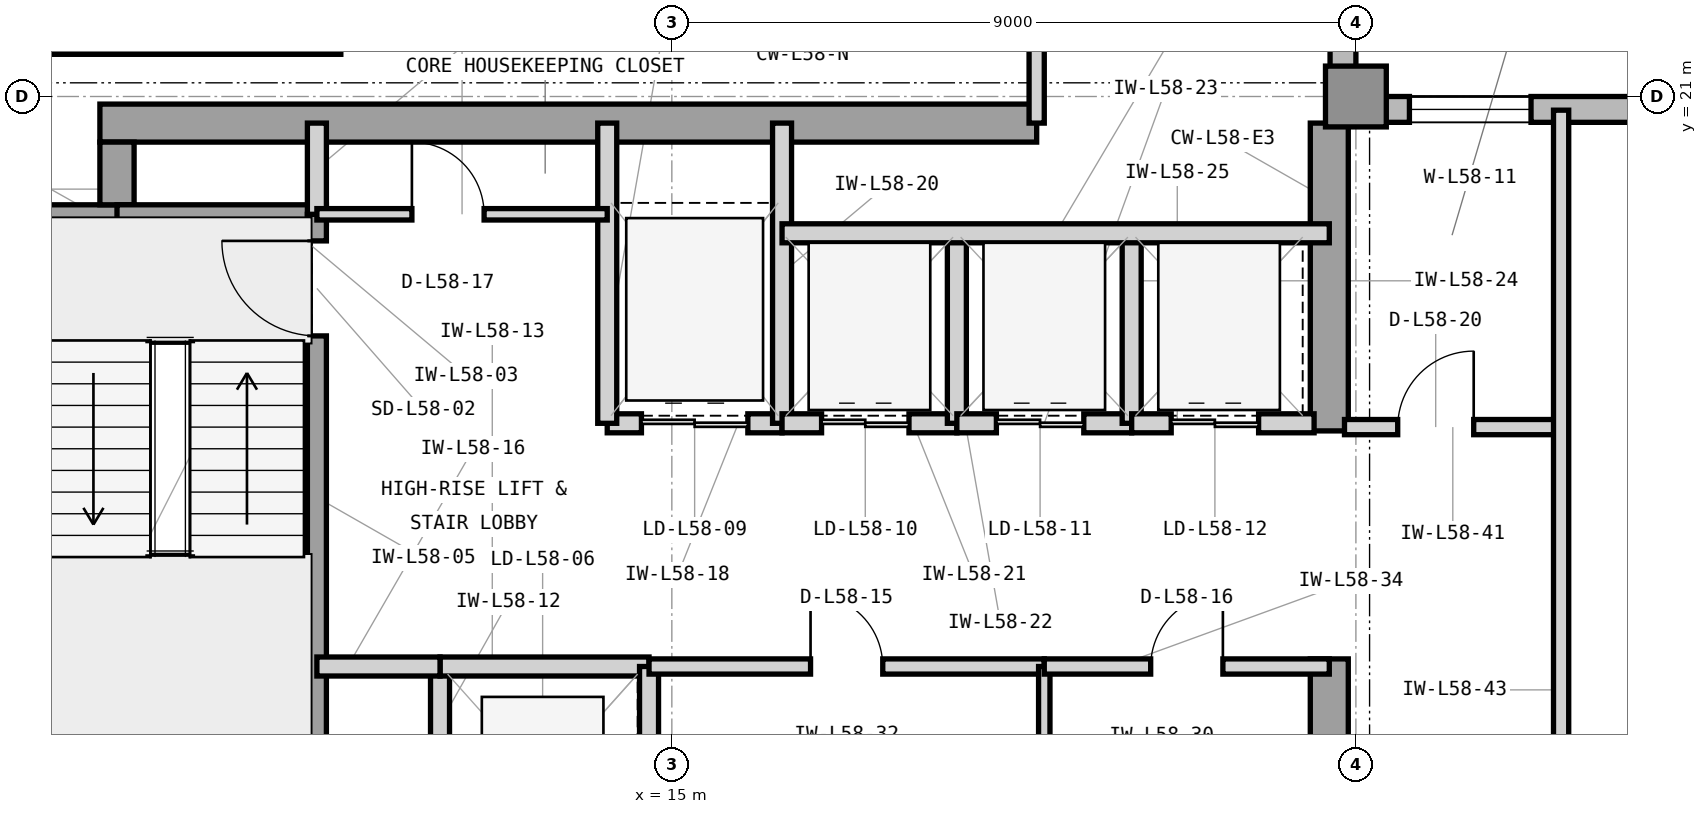
"""IFC4 building model, lengths in metres.
Left out: names, types, materials, properties, quantities, classifications, styles, units other than length and angle.
Written with IfcOpenShell. Run it as: python <this file> out.ifc"""

import sys

from ifc_helpers import new_model, si_unit, direction, frame, frame_2d, origin, origin_2d, place, context, subcontext, project, spatial, rectangle, extrude, element, fill, save


model = new_model("IFC4")
c1 = context("Model", 3, precision=1e-05, world=origin(), true_north=direction((0.0, 1.0)))
c2 = subcontext(c1, "Body", "Model", "MODEL_VIEW")
j1 = project(units=[si_unit("LENGTHUNIT", "METRE"), si_unit("PLANEANGLEUNIT", "RADIAN")], contexts=[c1])
p1 = place(None, origin())
s1 = spatial("IfcSite", under=j1, at=p1, CompositionType="ELEMENT")
p2 = place(p1, origin())
s2 = spatial("IfcBuilding", under=s1, at=p2, CompositionType="ELEMENT")
p3 = place(p2, frame((0.0, 0.0, 239.1)))
s3 = spatial("IfcBuildingStorey", under=s2, at=p3, CompositionType="ELEMENT", Elevation=239.1)
p4 = place(p3, frame((7.475, 20.65, 0.0), z_axis=(0.0, 0.0, 1.0), x_axis=(1.0, 0.0, 0.0)))
e1 = element("IfcWall", 1, at=p4, inside=s3, PredefinedType="SHEAR", context=c2, shape_type="SweptSolid", body=[
    extrude(rectangle(XDim=12.325, YDim=0.5, at=frame_2d((6.163, 0.0))), origin(), (0.0, 0.0, 1.0), 3.9),
])
p5 = place(p3, frame((23.65, 10.4, 0.0), z_axis=(0.0, 0.0, 1.0), x_axis=(0.0, 1.0, 0.0)))
e2 = element("IfcWall", 2, at=p5, inside=s3, PredefinedType="SHEAR", context=c2, shape_type="SweptSolid", body=[
    extrude(rectangle(XDim=3.2, YDim=0.5, at=frame_2d((1.6, 0.0))), origin(), (0.0, 0.0, 1.0), 3.9),
])
p6 = place(p3, frame((23.65, 16.6, 0.0), z_axis=(0.0, 0.0, 1.0), x_axis=(0.0, 1.0, 0.0)))
e3 = element("IfcWall", 3, at=p6, inside=s3, PredefinedType="SHEAR", context=c2, shape_type="SweptSolid", body=[
    extrude(rectangle(XDim=4.05, YDim=0.5, at=frame_2d((2.025, 0.0))), origin(), (0.0, 0.0, 1.0), 3.9),
])
p7 = place(p3, frame((6.6, 19.35, 0.0), z_axis=(0.0, 0.0, 1.0), x_axis=(1.0, 0.0, 0.0)))
e4 = element("IfcWall", 4, at=p7, inside=s3, PredefinedType="SHEAR", context=c2, shape_type="SweptSolid", body=[
    extrude(rectangle(XDim=1.325, YDim=0.45, at=frame_2d((0.663, 0.0))), origin(), (0.0, 0.0, 1.0), 3.9),
])
p8 = place(p3, frame((7.7, 19.575, 0.0), z_axis=(0.0, 0.0, 1.0), x_axis=(0.0, 1.0, 0.0)))
e5 = element("IfcWall", 5, at=p8, inside=s3, PredefinedType="SHEAR", context=c2, shape_type="SweptSolid", body=[
    extrude(rectangle(XDim=0.825, YDim=0.45, at=frame_2d((0.413, 0.0))), origin(), (0.0, 0.0, 1.0), 3.9),
])
p9 = place(p3, frame((24.0, 21.0, 0.0), z_axis=(0.0, 0.0, 1.0), x_axis=(1.0, 0.0, 0.0)))
e6 = element("IfcColumn", 6, at=p9, inside=s3, PredefinedType="COLUMN", context=c2, shape_type="SweptSolid", body=[
    extrude(rectangle(XDim=0.8, YDim=0.8, at=origin_2d()), origin(), (0.0, 0.0, 1.0), 3.9),
])
p10 = place(p3, frame((52.4, 20.83, 0.0), z_axis=(0.0, 0.0, 1.0), x_axis=(-1.0, 0.0, 0.0)))
e7 = element("IfcWall", 7, at=p10, inside=s3, PredefinedType="STANDARD", context=c2, shape_type="SweptSolid", body=[
    extrude(rectangle(XDim=28.4, YDim=0.34, at=frame_2d((14.2, 0.0))), origin(), (0.0, 0.0, 1.0), 3.7),
])
p11 = place(p10, frame((5.95, 0.0, 0.9)))
e8 = element("IfcOpeningElement", 8, at=p11, cuts=e7, PredefinedType="OPENING", context=c2, shape_type="SweptSolid", body=[
    extrude(rectangle(XDim=2.3, YDim=2.2, at=frame_2d((1.15, 1.1))), frame((0.0, 0.18, 0.0), z_axis=(0.0, -1.0, 0.0), x_axis=(1.0, 0.0, 0.0)), (0.0, 0.0, 1.0), 0.36),
])
p12 = place(p10, frame((15.417, 0.0, 0.9)))
e9 = element("IfcOpeningElement", 9, at=p12, cuts=e7, PredefinedType="OPENING", context=c2, shape_type="SweptSolid", body=[
    extrude(rectangle(XDim=2.3, YDim=2.2, at=frame_2d((1.15, 1.1))), frame((0.0, 0.18, 0.0), z_axis=(0.0, -1.0, 0.0), x_axis=(1.0, 0.0, 0.0)), (0.0, 0.0, 1.0), 0.36),
])
p13 = place(p10, frame((26.096, 0.0, 0.9)))
e10 = element("IfcOpeningElement", 10, at=p13, cuts=e7, PredefinedType="OPENING", context=c2, shape_type="SweptSolid", body=[
    extrude(rectangle(XDim=1.6, YDim=2.2, at=frame_2d((0.8, 1.1))), frame((0.0, 0.18, 0.0), z_axis=(0.0, -1.0, 0.0), x_axis=(1.0, 0.0, 0.0)), (0.0, 0.0, 1.0), 0.36),
])
p14 = place(p3, frame((23.83, 21.0, 0.0), z_axis=(0.0, 0.0, 1.0), x_axis=(0.0, 1.0, 0.0)))
e11 = element("IfcWall", 11, at=p14, inside=s3, PredefinedType="STANDARD", context=c2, shape_type="SweptSolid", body=[
    extrude(rectangle(XDim=19.4, YDim=0.34, at=frame_2d((9.7, 0.0))), origin(), (0.0, 0.0, 1.0), 3.7),
])
p15 = place(p14, frame((10.975, 0.0, 0.9)))
e12 = element("IfcOpeningElement", 12, at=p15, cuts=e11, PredefinedType="OPENING", context=c2, shape_type="SweptSolid", body=[
    extrude(rectangle(XDim=2.3, YDim=2.2, at=frame_2d((1.15, 1.1))), frame((0.0, 0.18, 0.0), z_axis=(0.0, -1.0, 0.0), x_axis=(1.0, 0.0, 0.0)), (0.0, 0.0, 1.0), 0.36),
])
p16 = place(p3, frame((7.7, 19.45, 0.0), z_axis=(0.0, 0.0, 1.0), x_axis=(1.0, 0.0, 0.0)))
e13 = element("IfcWall", 13, at=p16, inside=s3, PredefinedType="SHEAR", context=c2, shape_type="SweptSolid", body=[
    extrude(rectangle(XDim=2.755, YDim=0.25, at=frame_2d((1.377, 0.0))), origin(), (0.0, 0.0, 1.0), 3.9),
])
p17 = place(p3, frame((10.33, 12.0, 0.0), z_axis=(0.0, 0.0, 1.0), x_axis=(0.0, 1.0, 0.0)))
e14 = element("IfcWall", 14, at=p17, inside=s3, PredefinedType="SHEAR", context=c2, shape_type="SweptSolid", body=[
    extrude(rectangle(XDim=7.45, YDim=0.25, at=frame_2d((3.725, 0.0))), origin(), (0.0, 0.0, 1.0), 3.9),
])
p18 = place(p17, frame((5.85, 0.0, 0.0)))
e15 = element("IfcOpeningElement", 15, at=p18, cuts=e14, PredefinedType="OPENING", context=c2, shape_type="SweptSolid", body=[
    extrude(rectangle(XDim=1.25, YDim=2.2, at=frame_2d((0.625, 1.1))), frame((0.0, 0.135, 0.0), z_axis=(0.0, -1.0, 0.0), x_axis=(1.0, 0.0, 0.0)), (0.0, 0.0, 1.0), 0.27),
])
p19 = place(p3, frame((10.33, 19.45, 0.0), z_axis=(0.0, 0.0, 1.0), x_axis=(0.0, 1.0, 0.0)))
e16 = element("IfcWall", 16, at=p19, inside=s3, PredefinedType="PARTITIONING", context=c2, shape_type="SweptSolid", body=[
    extrude(rectangle(XDim=1.2, YDim=0.25, at=frame_2d((0.6, 0.0))), origin(), (0.0, 0.0, 1.0), 3.69),
])
p20 = place(p3, frame((11.95, 10.5, 0.0), z_axis=(0.0, 0.0, 1.0), x_axis=(0.0, 1.0, 0.0)))
e17 = element("IfcWall", 17, at=p20, inside=s3, PredefinedType="PARTITIONING", context=c2, shape_type="SweptSolid", body=[
    extrude(rectangle(XDim=3.0, YDim=0.25, at=frame_2d((1.5, 0.0))), origin(), (0.0, 0.0, 1.0), 3.69),
])
p21 = place(p3, frame((11.95, 13.5, 0.0), z_axis=(0.0, 0.0, 1.0), x_axis=(1.0, 0.0, 0.0)))
e18 = element("IfcWall", 18, at=p21, inside=s3, PredefinedType="PARTITIONING", context=c2, shape_type="SweptSolid", body=[
    extrude(rectangle(XDim=2.75, YDim=0.25, at=frame_2d((1.375, 0.0))), origin(), (0.0, 0.0, 1.0), 3.073),
])
p22 = place(p3, frame((14.7, 10.5, 0.0), z_axis=(0.0, 0.0, 1.0), x_axis=(0.0, 1.0, 0.0)))
e19 = element("IfcWall", 19, at=p22, inside=s3, PredefinedType="PARTITIONING", context=c2, shape_type="SweptSolid", body=[
    extrude(rectangle(XDim=3.0, YDim=0.25, at=frame_2d((1.5, 0.0))), origin(), (0.0, 0.0, 1.0), 3.69),
])
p23 = place(p3, frame((10.33, 13.5, 0.0), z_axis=(0.0, 0.0, 1.0), x_axis=(1.0, 0.0, 0.0)))
e20 = element("IfcWall", 20, at=p23, inside=s3, PredefinedType="PARTITIONING", context=c2, shape_type="SweptSolid", body=[
    extrude(rectangle(XDim=1.62, YDim=0.25, at=frame_2d((0.81, 0.0))), origin(), (0.0, 0.0, 1.0), 3.073),
])
p24 = place(p3, frame((14.15, 16.7, 0.0), z_axis=(0.0, 0.0, 1.0), x_axis=(1.0, 0.0, 0.0)))
e21 = element("IfcWall", 21, at=p24, inside=s3, PredefinedType="PARTITIONING", context=c2, shape_type="SweptSolid", body=[
    extrude(rectangle(XDim=2.3, YDim=0.25, at=frame_2d((1.15, 0.0))), origin(), (0.0, 0.0, 1.0), 3.073),
])
p25 = place(p24, frame((0.45, 0.0, 0.0)))
e22 = element("IfcOpeningElement", 22, at=p25, cuts=e21, PredefinedType="OPENING", context=c2, shape_type="SweptSolid", body=[
    extrude(rectangle(XDim=1.4, YDim=2.35, at=frame_2d((0.7, 1.175))), frame((0.0, 0.135, 0.0), z_axis=(0.0, -1.0, 0.0), x_axis=(1.0, 0.0, 0.0)), (0.0, 0.0, 1.0), 0.27),
])
for number, where, z_axis, x_axis in (
    (23, (14.15, 16.7, 0.0), (0.0, 0.0, 1.0), (0.0, 1.0, 0.0)),
    (24, (16.45, 16.7, 0.0), (0.0, 0.0, 1.0), (0.0, 1.0, 0.0)),
):
    element("IfcWall", number, at=place(p3, frame(where, z_axis=z_axis, x_axis=x_axis)), inside=s3, PredefinedType="PARTITIONING", context=c2, shape_type="SweptSolid", body=[
        extrude(rectangle(XDim=3.95, YDim=0.25, at=frame_2d((1.975, 0.0))), origin(), (0.0, 0.0, 1.0), 3.69),
    ])
p26 = place(p3, frame((16.45, 16.7, 0.0), z_axis=(0.0, 0.0, 1.0), x_axis=(1.0, 0.0, 0.0)))
e25 = element("IfcWall", 25, at=p26, inside=s3, PredefinedType="PARTITIONING", context=c2, shape_type="SweptSolid", body=[
    extrude(rectangle(XDim=2.3, YDim=0.25, at=frame_2d((1.15, 0.0))), origin(), (0.0, 0.0, 1.0), 3.073),
])
p27 = place(p26, frame((0.52, 0.0, 0.0)))
e26 = element("IfcOpeningElement", 26, at=p27, cuts=e25, PredefinedType="OPENING", context=c2, shape_type="SweptSolid", body=[
    extrude(rectangle(XDim=1.15, YDim=2.25, at=frame_2d((0.575, 1.125))), frame((0.0, 0.135, 0.0), z_axis=(0.0, -1.0, 0.0), x_axis=(1.0, 0.0, 0.0)), (0.0, 0.0, 1.0), 0.27),
])
p28 = place(p3, frame((18.75, 16.7, 0.0), z_axis=(0.0, 0.0, 1.0), x_axis=(0.0, 1.0, 0.0)))
e27 = element("IfcWall", 27, at=p28, inside=s3, PredefinedType="PARTITIONING", context=c2, shape_type="SweptSolid", body=[
    extrude(rectangle(XDim=2.5, YDim=0.25, at=frame_2d((1.25, 0.0))), origin(), (0.0, 0.0, 1.0), 3.69),
])
p29 = place(p3, frame((18.75, 16.7, 0.0), z_axis=(0.0, 0.0, 1.0), x_axis=(1.0, 0.0, 0.0)))
e28 = element("IfcWall", 28, at=p29, inside=s3, PredefinedType="PARTITIONING", context=c2, shape_type="SweptSolid", body=[
    extrude(rectangle(XDim=2.3, YDim=0.25, at=frame_2d((1.15, 0.0))), origin(), (0.0, 0.0, 1.0), 3.073),
])
p30 = place(p29, frame((0.52, 0.0, 0.0)))
e29 = element("IfcOpeningElement", 29, at=p30, cuts=e28, PredefinedType="OPENING", context=c2, shape_type="SweptSolid", body=[
    extrude(rectangle(XDim=1.15, YDim=2.25, at=frame_2d((0.575, 1.125))), frame((0.0, 0.135, 0.0), z_axis=(0.0, -1.0, 0.0), x_axis=(1.0, 0.0, 0.0)), (0.0, 0.0, 1.0), 0.27),
])
p31 = place(p3, frame((21.05, 16.7, 0.0), z_axis=(0.0, 0.0, 1.0), x_axis=(0.0, 1.0, 0.0)))
e30 = element("IfcWall", 30, at=p31, inside=s3, PredefinedType="PARTITIONING", context=c2, shape_type="SweptSolid", body=[
    extrude(rectangle(XDim=2.5, YDim=0.25, at=frame_2d((1.25, 0.0))), origin(), (0.0, 0.0, 1.0), 3.69),
])
p32 = place(p3, frame((21.05, 16.7, 0.0), z_axis=(0.0, 0.0, 1.0), x_axis=(1.0, 0.0, 0.0)))
e31 = element("IfcWall", 31, at=p32, inside=s3, PredefinedType="PARTITIONING", context=c2, shape_type="SweptSolid", body=[
    extrude(rectangle(XDim=2.4, YDim=0.25, at=frame_2d((1.2, 0.0))), origin(), (0.0, 0.0, 1.0), 3.073),
])
p33 = place(p32, frame((0.52, 0.0, 0.0)))
e32 = element("IfcOpeningElement", 32, at=p33, cuts=e31, PredefinedType="OPENING", context=c2, shape_type="SweptSolid", body=[
    extrude(rectangle(XDim=1.15, YDim=2.25, at=frame_2d((0.575, 1.125))), frame((0.0, 0.135, 0.0), z_axis=(0.0, -1.0, 0.0), x_axis=(1.0, 0.0, 0.0)), (0.0, 0.0, 1.0), 0.27),
])
p34 = place(p3, frame((16.45, 19.2, 0.0), z_axis=(0.0, 0.0, 1.0), x_axis=(1.0, 0.0, 0.0)))
e33 = element("IfcWall", 33, at=p34, inside=s3, PredefinedType="PARTITIONING", context=c2, shape_type="SweptSolid", body=[
    extrude(rectangle(XDim=7.2, YDim=0.25, at=frame_2d((3.6, 0.0))), origin(), (0.0, 0.0, 1.0), 3.69),
])
p35 = place(p3, frame((14.7, 13.5, 0.0), z_axis=(0.0, 0.0, 1.0), x_axis=(1.0, 0.0, 0.0)))
e34 = element("IfcWall", 34, at=p35, inside=s3, PredefinedType="PARTITIONING", context=c2, shape_type="SweptSolid", body=[
    extrude(rectangle(XDim=5.2, YDim=0.2, at=frame_2d((2.6, 0.0))), origin(), (0.0, 0.0, 1.0), 3.073),
])
p36 = place(p35, frame((2.125, 0.0, 0.0)))
e35 = element("IfcOpeningElement", 35, at=p36, cuts=e34, PredefinedType="OPENING", context=c2, shape_type="SweptSolid", body=[
    extrude(rectangle(XDim=0.95, YDim=2.1, at=frame_2d((0.475, 1.05))), frame((0.0, 0.11, 0.0), z_axis=(0.0, -1.0, 0.0), x_axis=(1.0, 0.0, 0.0)), (0.0, 0.0, 1.0), 0.22),
])
p37 = place(p3, frame((19.9, 9.88, 0.0), z_axis=(0.0, 0.0, 1.0), x_axis=(0.0, 1.0, 0.0)))
e36 = element("IfcWall", 36, at=p37, inside=s3, PredefinedType="PARTITIONING", context=c2, shape_type="SweptSolid", body=[
    extrude(rectangle(XDim=3.62, YDim=0.15, at=frame_2d((1.81, 0.0))), origin(), (0.0, 0.0, 1.0), 3.69),
])
p38 = place(p3, frame((19.9, 13.5, 0.0), z_axis=(0.0, 0.0, 1.0), x_axis=(1.0, 0.0, 0.0)))
e37 = element("IfcWall", 37, at=p38, inside=s3, PredefinedType="PARTITIONING", context=c2, shape_type="SweptSolid", body=[
    extrude(rectangle(XDim=3.75, YDim=0.2, at=frame_2d((1.875, 0.0))), origin(), (0.0, 0.0, 1.0), 3.073),
])
p39 = place(p38, frame((1.4, 0.0, 0.0)))
e38 = element("IfcOpeningElement", 38, at=p39, cuts=e37, PredefinedType="OPENING", context=c2, shape_type="SweptSolid", body=[
    extrude(rectangle(XDim=0.95, YDim=2.1, at=frame_2d((0.475, 1.05))), frame((0.0, 0.11, 0.0), z_axis=(0.0, -1.0, 0.0), x_axis=(1.0, 0.0, 0.0)), (0.0, 0.0, 1.0), 0.22),
])
p40 = place(p3, frame((10.33, 19.45, 0.0), z_axis=(0.0, 0.0, 1.0), x_axis=(1.0, 0.0, 0.0)))
e39 = element("IfcWall", 39, at=p40, inside=s3, PredefinedType="PARTITIONING", context=c2, shape_type="SweptSolid", body=[
    extrude(rectangle(XDim=3.82, YDim=0.15, at=frame_2d((1.91, 0.0))), origin(), (0.0, 0.0, 1.0), 3.69),
])
p41 = place(p40, frame((1.25, 0.0, 0.0)))
e40 = element("IfcOpeningElement", 40, at=p41, cuts=e39, PredefinedType="OPENING", context=c2, shape_type="SweptSolid", body=[
    extrude(rectangle(XDim=0.95, YDim=2.1, at=frame_2d((0.475, 1.05))), frame((0.0, 0.085, 0.0), z_axis=(0.0, -1.0, 0.0), x_axis=(1.0, 0.0, 0.0)), (0.0, 0.0, 1.0), 0.17),
])
p42 = place(p3, frame((6.555, 21.68, 0.0), z_axis=(0.0, 0.0, 1.0), x_axis=(1.0, 0.0, 0.0)))
e41 = element("IfcWall", 41, at=p42, inside=s3, PredefinedType="SHEAR", context=c2, shape_type="SweptSolid", body=[
    extrude(rectangle(XDim=4.09, YDim=0.25, at=frame_2d((2.045, 0.0))), origin(), (0.0, 0.0, 1.0), 3.9),
])
p43 = place(p3, frame((23.85, 16.65, 0.0), z_axis=(0.0, 0.0, 1.0), x_axis=(1.0, 0.0, 0.0)))
e42 = element("IfcWall", 42, at=p43, inside=s3, PredefinedType="PARTITIONING", context=c2, shape_type="SweptSolid", body=[
    extrude(rectangle(XDim=2.85, YDim=0.2, at=frame_2d((1.425, 0.0))), origin(), (0.0, 0.0, 1.0), 3.69),
])
p44 = place(p43, frame((0.7, 0.0, 0.0)))
e43 = element("IfcOpeningElement", 43, at=p44, cuts=e42, PredefinedType="OPENING", context=c2, shape_type="SweptSolid", body=[
    extrude(rectangle(XDim=1.0, YDim=2.15, at=frame_2d((0.5, 1.075))), frame((0.0, 0.11, 0.0), z_axis=(0.0, -1.0, 0.0), x_axis=(1.0, 0.0, 0.0)), (0.0, 0.0, 1.0), 0.22),
])
p45 = place(p3, frame((26.7, 10.65, 0.0), z_axis=(0.0, 0.0, 1.0), x_axis=(0.0, 1.0, 0.0)))
e44 = element("IfcWall", 44, at=p45, inside=s3, PredefinedType="PARTITIONING", context=c2, shape_type="SweptSolid", body=[
    extrude(rectangle(XDim=10.17, YDim=0.2, at=frame_2d((5.085, 0.0))), origin(), (0.0, 0.0, 1.0), 3.69),
])
p46 = place(p3, frame((19.8, 20.65, 0.0), z_axis=(0.0, 0.0, 1.0), x_axis=(0.0, 1.0, 0.0)))
e45 = element("IfcWall", 45, at=p46, inside=s3, PredefinedType="PARTITIONING", context=c2, shape_type="SweptSolid", body=[
    extrude(rectangle(XDim=6.15, YDim=0.2, at=frame_2d((3.075, 0.0))), origin(), (0.0, 0.0, 1.0), 3.69),
])
p47 = place(p18, origin())
e46 = element("IfcDoor", 46, at=p47, inside=s3, OperationType="SINGLE_SWING_RIGHT", PredefinedType="DOOR", context=c2, shape_type="SweptSolid", body=[
    extrude(rectangle(XDim=1.25, YDim=2.2, at=frame_2d((0.625, 1.1))), frame((0.0, 0.025, 0.0), z_axis=(0.0, -1.0, 0.0), x_axis=(1.0, 0.0, 0.0)), (0.0, 0.0, 1.0), 0.05),
])
fill(e15, e46)
p48 = place(p25, origin())
e47 = element("IfcDoor", 47, at=p48, inside=s3, OperationType="DOUBLE_DOOR_SLIDING", PredefinedType="DOOR", context=c2, shape_type="SweptSolid", body=[
    extrude(rectangle(XDim=1.4, YDim=2.35, at=frame_2d((0.7, 1.175))), frame((0.0, 0.025, 0.0), z_axis=(0.0, -1.0, 0.0), x_axis=(1.0, 0.0, 0.0)), (0.0, 0.0, 1.0), 0.05),
])
fill(e22, e47)
p49 = place(p27, origin())
e48 = element("IfcDoor", 48, at=p49, inside=s3, OperationType="DOUBLE_DOOR_SLIDING", PredefinedType="DOOR", context=c2, shape_type="SweptSolid", body=[
    extrude(rectangle(XDim=1.15, YDim=2.25, at=frame_2d((0.575, 1.125))), frame((0.0, 0.025, 0.0), z_axis=(0.0, -1.0, 0.0), x_axis=(1.0, 0.0, 0.0)), (0.0, 0.0, 1.0), 0.05),
])
fill(e26, e48)
p50 = place(p30, origin())
e49 = element("IfcDoor", 49, at=p50, inside=s3, OperationType="DOUBLE_DOOR_SLIDING", PredefinedType="DOOR", context=c2, shape_type="SweptSolid", body=[
    extrude(rectangle(XDim=1.15, YDim=2.25, at=frame_2d((0.575, 1.125))), frame((0.0, 0.025, 0.0), z_axis=(0.0, -1.0, 0.0), x_axis=(1.0, 0.0, 0.0)), (0.0, 0.0, 1.0), 0.05),
])
fill(e29, e49)
p51 = place(p33, origin())
e50 = element("IfcDoor", 50, at=p51, inside=s3, OperationType="DOUBLE_DOOR_SLIDING", PredefinedType="DOOR", context=c2, shape_type="SweptSolid", body=[
    extrude(rectangle(XDim=1.15, YDim=2.25, at=frame_2d((0.575, 1.125))), frame((0.0, 0.025, 0.0), z_axis=(0.0, -1.0, 0.0), x_axis=(1.0, 0.0, 0.0)), (0.0, 0.0, 1.0), 0.05),
])
fill(e32, e50)
p52 = place(p36, origin())
e51 = element("IfcDoor", 51, at=p52, inside=s3, OperationType="SINGLE_SWING_LEFT", PredefinedType="DOOR", context=c2, shape_type="SweptSolid", body=[
    extrude(rectangle(XDim=0.95, YDim=2.1, at=frame_2d((0.475, 1.05))), frame((0.0, 0.025, 0.0), z_axis=(0.0, -1.0, 0.0), x_axis=(1.0, 0.0, 0.0)), (0.0, 0.0, 1.0), 0.05),
])
fill(e35, e51)
p53 = place(p39, origin())
e52 = element("IfcDoor", 52, at=p53, inside=s3, OperationType="SINGLE_SWING_RIGHT", PredefinedType="DOOR", context=c2, shape_type="SweptSolid", body=[
    extrude(rectangle(XDim=0.95, YDim=2.1, at=frame_2d((0.475, 1.05))), frame((0.0, 0.025, 0.0), z_axis=(0.0, -1.0, 0.0), x_axis=(1.0, 0.0, 0.0)), (0.0, 0.0, 1.0), 0.05),
])
fill(e38, e52)
p54 = place(p41, origin())
e53 = element("IfcDoor", 53, at=p54, inside=s3, OperationType="SINGLE_SWING_LEFT", PredefinedType="DOOR", context=c2, shape_type="SweptSolid", body=[
    extrude(rectangle(XDim=0.95, YDim=2.1, at=frame_2d((0.475, 1.05))), frame((0.0, 0.025, 0.0), z_axis=(0.0, -1.0, 0.0), x_axis=(1.0, 0.0, 0.0)), (0.0, 0.0, 1.0), 0.05),
])
fill(e40, e53)
p55 = place(p44, origin())
e54 = element("IfcDoor", 54, at=p55, inside=s3, OperationType="SINGLE_SWING_RIGHT", PredefinedType="DOOR", context=c2, shape_type="SweptSolid", body=[
    extrude(rectangle(XDim=1.0, YDim=2.15, at=frame_2d((0.5, 1.075))), frame((0.0, 0.025, 0.0), z_axis=(0.0, -1.0, 0.0), x_axis=(1.0, 0.0, 0.0)), (0.0, 0.0, 1.0), 0.05),
])
fill(e43, e54)
p56 = place(p13, origin())
e55 = element("IfcWindow", 55, at=p56, inside=s3, PartitioningType="SINGLE_PANEL", PredefinedType="WINDOW", context=c2, shape_type="SweptSolid", body=[
    extrude(rectangle(XDim=1.6, YDim=2.2, at=frame_2d((0.8, 1.1))), frame((0.0, 0.11, 0.0), z_axis=(0.0, -1.0, 0.0), x_axis=(1.0, 0.0, 0.0)), (0.0, 0.0, 1.0), 0.06),
])
fill(e10, e55)
save(model, sys.argv[1])
